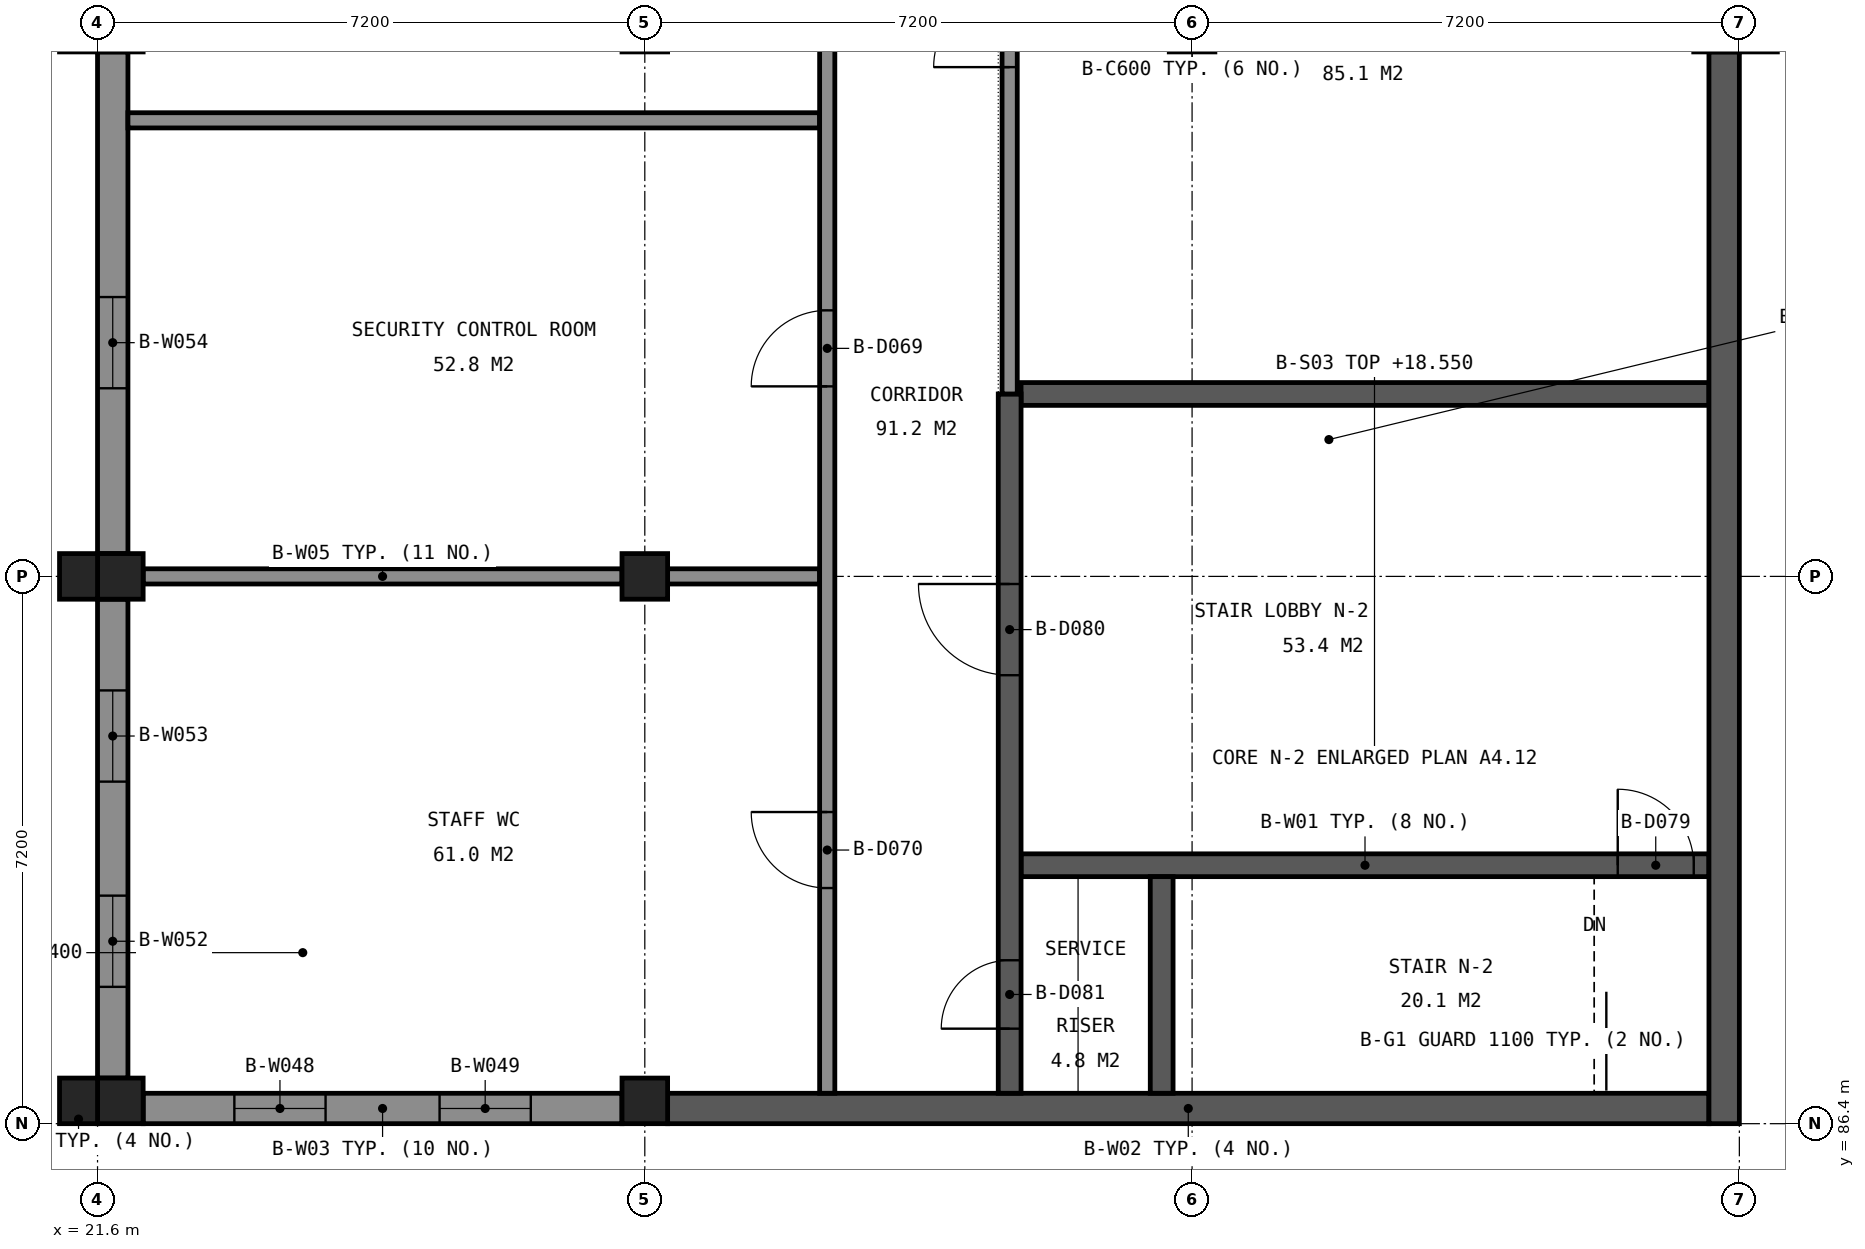
"""IFC4 building model, lengths in metres.
Left out: names, types, materials, properties, quantities, classifications, styles, units other than length and angle.
Written with IfcOpenShell. Run it as: python <this file> out.ifc"""

import sys

from ifc_helpers import new_model, si_unit, direction, frame, frame_2d, origin, origin_2d, place, context, subcontext, project, spatial, rectangle, extrude, element, fill, save


model = new_model("IFC4")
c1 = context("Model", 3, precision=1e-05, world=origin(), true_north=direction((0.0, 1.0)))
c2 = subcontext(c1, "Body", "Model", "MODEL_VIEW")
j1 = project(units=[si_unit("LENGTHUNIT", "METRE"), si_unit("PLANEANGLEUNIT", "RADIAN")], contexts=[c1])
p1 = place(None, origin())
s1 = spatial("IfcSite", under=j1, at=p1, CompositionType="ELEMENT")
p2 = place(p1, origin())
s2 = spatial("IfcBuilding", under=s1, at=p2, CompositionType="ELEMENT")
p3 = place(p2, frame((0.0, 0.0, 14.4)))
s3 = spatial("IfcBuildingStorey", under=s2, at=p3, CompositionType="ELEMENT", Elevation=14.4)
for number, where, z_axis, x_axis in (
    (1, (21.9, 93.6, 0.0), (0.0, 0.0, 1.0), (1.0, 0.0, 0.0)),
    (2, (21.9, 86.7, 0.0), (0.0, 0.0, 1.0), (1.0, 0.0, 0.0)),
):
    element("IfcColumn", number, at=place(p3, frame(where, z_axis=z_axis, x_axis=x_axis)), inside=s3, PredefinedType="COLUMN", context=c2, shape_type="SweptSolid", body=[
        extrude(rectangle(XDim=0.6, YDim=0.6, at=origin_2d()), origin(), (0.0, 0.0, 1.0), 4.138),
    ])
p4 = place(p3, frame((28.8, 93.6, 0.0), z_axis=(0.0, 0.0, 1.0), x_axis=(1.0, 0.0, 0.0)))
e3 = element("IfcColumn", 3, at=p4, inside=s3, PredefinedType="COLUMN", context=c2, shape_type="SweptSolid", body=[
    extrude(rectangle(XDim=0.6, YDim=0.6, at=origin_2d()), origin(), (0.0, 0.0, 1.0), 4.713),
])
p5 = place(p3, frame((28.8, 86.7, 0.0), z_axis=(0.0, 0.0, 1.0), x_axis=(1.0, 0.0, 0.0)))
e4 = element("IfcColumn", 4, at=p5, inside=s3, PredefinedType="COLUMN", context=c2, shape_type="SweptSolid", body=[
    extrude(rectangle(XDim=0.6, YDim=0.6, at=origin_2d()), origin(), (0.0, 0.0, 1.0), 4.138),
])
p6 = place(p3, frame((29.1, 86.6, 0.0), z_axis=(0.0, 0.0, 1.0), x_axis=(1.0, 0.0, 0.0)))
e5 = element("IfcWall", 5, at=p6, inside=s3, PredefinedType="SHEAR", context=c2, shape_type="SweptSolid", body=[
    extrude(rectangle(XDim=13.7, YDim=0.4, at=frame_2d((6.85, 0.0))), origin(), (0.0, 0.0, 1.0), 3.9),
])
p7 = place(p3, frame((33.75, 89.8, 0.0), z_axis=(0.0, 0.0, 1.0), x_axis=(1.0, 0.0, 0.0)))
e6 = element("IfcWall", 6, at=p7, inside=s3, PredefinedType="SHEAR", context=c2, shape_type="SweptSolid", body=[
    extrude(rectangle(XDim=9.05, YDim=0.3, at=frame_2d((4.525, 0.0))), origin(), (0.0, 0.0, 1.0), 3.9),
])
p8 = place(p7, frame((7.85, 0.0, 0.0)))
e7 = element("IfcOpeningElement", 7, at=p8, cuts=e6, PredefinedType="OPENING", context=c2, shape_type="SweptSolid", body=[
    extrude(rectangle(XDim=1.0, YDim=2.1, at=frame_2d((0.5, 1.05))), frame((0.0, 0.16, 0.0), z_axis=(0.0, -1.0, 0.0), x_axis=(1.0, 0.0, 0.0)), (0.0, 0.0, 1.0), 0.32),
])
p9 = place(p3, frame((33.75, 96.0, 0.0), z_axis=(0.0, 0.0, 1.0), x_axis=(1.0, 0.0, 0.0)))
e8 = element("IfcWall", 8, at=p9, inside=s3, PredefinedType="SHEAR", context=c2, shape_type="SweptSolid", body=[
    extrude(rectangle(XDim=9.05, YDim=0.3, at=frame_2d((4.525, 0.0))), origin(), (0.0, 0.0, 1.0), 3.9),
])
p10 = place(p3, frame((33.6, 86.8, 0.0), z_axis=(0.0, 0.0, 1.0), x_axis=(0.0, 1.0, 0.0)))
e9 = element("IfcWall", 9, at=p10, inside=s3, PredefinedType="SHEAR", context=c2, shape_type="SweptSolid", body=[
    extrude(rectangle(XDim=9.2, YDim=0.3, at=frame_2d((4.6, 0.0))), origin(), (0.0, 0.0, 1.0), 3.9),
])
p11 = place(p10, frame((5.5, 0.0, 0.0)))
e10 = element("IfcOpeningElement", 10, at=p11, cuts=e9, PredefinedType="OPENING", context=c2, shape_type="SweptSolid", body=[
    extrude(rectangle(XDim=1.2, YDim=2.1, at=frame_2d((0.6, 1.05))), frame((0.0, 0.16, 0.0), z_axis=(0.0, -1.0, 0.0), x_axis=(1.0, 0.0, 0.0)), (0.0, 0.0, 1.0), 0.32),
])
p12 = place(p10, frame((0.85, 0.0, 0.0)))
e11 = element("IfcOpeningElement", 11, at=p12, cuts=e9, PredefinedType="OPENING", context=c2, shape_type="SweptSolid", body=[
    extrude(rectangle(XDim=0.9, YDim=2.1, at=frame_2d((0.45, 1.05))), frame((0.0, 0.16, 0.0), z_axis=(0.0, -1.0, 0.0), x_axis=(1.0, 0.0, 0.0)), (0.0, 0.0, 1.0), 0.32),
])
p13 = place(p3, frame((35.6, 86.8, 0.0), z_axis=(0.0, 0.0, 1.0), x_axis=(0.0, 1.0, 0.0)))
e12 = element("IfcWall", 12, at=p13, inside=s3, PredefinedType="SHEAR", context=c2, shape_type="SweptSolid", body=[
    extrude(rectangle(XDim=2.85, YDim=0.3, at=frame_2d((1.425, 0.0))), origin(), (0.0, 0.0, 1.0), 3.9),
])
p14 = place(p3, frame((43.0, 86.4, 0.0), z_axis=(0.0, 0.0, 1.0), x_axis=(0.0, 1.0, 0.0)))
e13 = element("IfcWall", 13, at=p14, inside=s3, PredefinedType="SHEAR", context=c2, shape_type="SweptSolid", body=[
    extrude(rectangle(XDim=14.1, YDim=0.4, at=frame_2d((7.05, 0.0))), origin(), (0.0, 0.0, 1.0), 3.9),
])
p15 = place(p3, frame((22.2, 86.6, 0.0), z_axis=(0.0, 0.0, 1.0), x_axis=(1.0, 0.0, 0.0)))
e14 = element("IfcWall", 14, at=p15, inside=s3, PredefinedType="SOLIDWALL", context=c2, shape_type="SweptSolid", body=[
    extrude(rectangle(XDim=6.3, YDim=0.4, at=frame_2d((3.15, 0.0))), origin(), (0.0, 0.0, 1.0), 4.129),
])
p16 = place(p15, frame((1.2, 0.0, 1.6)))
e15 = element("IfcOpeningElement", 15, at=p16, cuts=e14, PredefinedType="OPENING", context=c2, shape_type="SweptSolid", body=[
    extrude(rectangle(XDim=1.2, YDim=1.2, at=frame_2d((0.6, 0.6))), frame((0.0, 0.21, 0.0), z_axis=(0.0, -1.0, 0.0), x_axis=(1.0, 0.0, 0.0)), (0.0, 0.0, 1.0), 0.42),
])
p17 = place(p15, frame((3.9, 0.0, 1.6)))
e16 = element("IfcOpeningElement", 16, at=p17, cuts=e14, PredefinedType="OPENING", context=c2, shape_type="SweptSolid", body=[
    extrude(rectangle(XDim=1.2, YDim=1.2, at=frame_2d((0.6, 0.6))), frame((0.0, 0.21, 0.0), z_axis=(0.0, -1.0, 0.0), x_axis=(1.0, 0.0, 0.0)), (0.0, 0.0, 1.0), 0.42),
])
p18 = place(p3, frame((21.8, 87.0, 0.0), z_axis=(0.0, 0.0, 1.0), x_axis=(0.0, 1.0, 0.0)))
e17 = element("IfcWall", 17, at=p18, inside=s3, PredefinedType="SOLIDWALL", context=c2, shape_type="SweptSolid", body=[
    extrude(rectangle(XDim=6.3, YDim=0.4, at=frame_2d((3.15, 0.0))), origin(), (0.0, 0.0, 1.0), 4.129),
])
p19 = place(p18, frame((1.2, 0.0, 1.6)))
e18 = element("IfcOpeningElement", 18, at=p19, cuts=e17, PredefinedType="OPENING", context=c2, shape_type="SweptSolid", body=[
    extrude(rectangle(XDim=1.2, YDim=1.2, at=frame_2d((0.6, 0.6))), frame((0.0, 0.21, 0.0), z_axis=(0.0, -1.0, 0.0), x_axis=(1.0, 0.0, 0.0)), (0.0, 0.0, 1.0), 0.42),
])
p20 = place(p18, frame((3.9, 0.0, 1.6)))
e19 = element("IfcOpeningElement", 19, at=p20, cuts=e17, PredefinedType="OPENING", context=c2, shape_type="SweptSolid", body=[
    extrude(rectangle(XDim=1.2, YDim=1.2, at=frame_2d((0.6, 0.6))), frame((0.0, 0.21, 0.0), z_axis=(0.0, -1.0, 0.0), x_axis=(1.0, 0.0, 0.0)), (0.0, 0.0, 1.0), 0.42),
])
p21 = place(p3, frame((21.8, 93.9, 0.0), z_axis=(0.0, 0.0, 1.0), x_axis=(0.0, 1.0, 0.0)))
e20 = element("IfcWall", 20, at=p21, inside=s3, PredefinedType="SOLIDWALL", context=c2, shape_type="SweptSolid", body=[
    extrude(rectangle(XDim=6.6, YDim=0.4, at=frame_2d((3.3, 0.0))), origin(), (0.0, 0.0, 1.0), 4.129),
])
p22 = place(p21, frame((2.175, 0.0, 1.6)))
e21 = element("IfcOpeningElement", 21, at=p22, cuts=e20, PredefinedType="OPENING", context=c2, shape_type="SweptSolid", body=[
    extrude(rectangle(XDim=1.2, YDim=1.2, at=frame_2d((0.6, 0.6))), frame((0.0, 0.21, 0.0), z_axis=(0.0, -1.0, 0.0), x_axis=(1.0, 0.0, 0.0)), (0.0, 0.0, 1.0), 0.42),
])
for number, where, z_axis, x_axis in (
    (22, (21.35, 86.7, 0.0), (0.0, 0.0, 1.0), (1.0, 0.0, 0.0)),
    (23, (21.35, 93.6, 0.0), (0.0, 0.0, 1.0), (1.0, 0.0, 0.0)),
):
    element("IfcColumn", number, at=place(p3, frame(where, z_axis=z_axis, x_axis=x_axis)), inside=s3, PredefinedType="COLUMN", context=c2, shape_type="SweptSolid", body=[
        extrude(rectangle(XDim=0.5, YDim=0.6, at=origin_2d()), origin(), (0.0, 0.0, 1.0), 3.8),
    ])
p23 = place(p3, frame((22.2, 93.6, 0.0), z_axis=(0.0, 0.0, 1.0), x_axis=(1.0, 0.0, 0.0)))
e24 = element("IfcWall", 24, at=p23, inside=s3, PredefinedType="PARTITIONING", context=c2, shape_type="SweptSolid", body=[
    extrude(rectangle(XDim=6.3, YDim=0.2, at=frame_2d((3.15, 0.0))), origin(), (0.0, 0.0, 1.0), 4.0),
])
p24 = place(p3, frame((29.1, 93.6, 0.0), z_axis=(0.0, 0.0, 1.0), x_axis=(1.0, 0.0, 0.0)))
e25 = element("IfcWall", 25, at=p24, inside=s3, PredefinedType="PARTITIONING", context=c2, shape_type="SweptSolid", body=[
    extrude(rectangle(XDim=2.0, YDim=0.2, at=frame_2d((1.0, 0.0))), origin(), (0.0, 0.0, 1.0), 4.0),
])
p25 = place(p3, frame((22.0, 99.6, 0.0), z_axis=(0.0, 0.0, 1.0), x_axis=(1.0, 0.0, 0.0)))
e26 = element("IfcWall", 26, at=p25, inside=s3, PredefinedType="PARTITIONING", context=c2, shape_type="SweptSolid", body=[
    extrude(rectangle(XDim=9.1, YDim=0.2, at=frame_2d((4.55, 0.0))), origin(), (0.0, 0.0, 1.0), 4.0),
])
p26 = place(p3, frame((31.2, 86.8, 0.0), z_axis=(0.0, 0.0, 1.0), x_axis=(0.0, 1.0, 0.0)))
e27 = element("IfcWall", 27, at=p26, inside=s3, PredefinedType="PARTITIONING", context=c2, shape_type="SweptSolid", body=[
    extrude(rectangle(XDim=42.4, YDim=0.2, at=frame_2d((21.2, 0.0))), origin(), (0.0, 0.0, 1.0), 4.0),
])
p27 = place(p26, frame((38.7, 0.0, 0.0)))
e28 = element("IfcOpeningElement", 28, at=p27, cuts=e27, PredefinedType="OPENING", context=c2, shape_type="SweptSolid", body=[
    extrude(rectangle(XDim=1.0, YDim=2.1, at=frame_2d((0.5, 1.05))), frame((0.0, 0.11, 0.0), z_axis=(0.0, -1.0, 0.0), x_axis=(1.0, 0.0, 0.0)), (0.0, 0.0, 1.0), 0.22),
])
p28 = place(p26, frame((31.5, 0.0, 0.0)))
e29 = element("IfcOpeningElement", 29, at=p28, cuts=e27, PredefinedType="OPENING", context=c2, shape_type="SweptSolid", body=[
    extrude(rectangle(XDim=1.0, YDim=2.1, at=frame_2d((0.5, 1.05))), frame((0.0, 0.11, 0.0), z_axis=(0.0, -1.0, 0.0), x_axis=(1.0, 0.0, 0.0)), (0.0, 0.0, 1.0), 0.22),
])
p29 = place(p26, frame((24.3, 0.0, 0.0)))
e30 = element("IfcOpeningElement", 30, at=p29, cuts=e27, PredefinedType="OPENING", context=c2, shape_type="SweptSolid", body=[
    extrude(rectangle(XDim=1.0, YDim=2.1, at=frame_2d((0.5, 1.05))), frame((0.0, 0.11, 0.0), z_axis=(0.0, -1.0, 0.0), x_axis=(1.0, 0.0, 0.0)), (0.0, 0.0, 1.0), 0.22),
])
p30 = place(p26, frame((16.5, 0.0, 0.0)))
e31 = element("IfcOpeningElement", 31, at=p30, cuts=e27, PredefinedType="OPENING", context=c2, shape_type="SweptSolid", body=[
    extrude(rectangle(XDim=1.0, YDim=2.1, at=frame_2d((0.5, 1.05))), frame((0.0, 0.11, 0.0), z_axis=(0.0, -1.0, 0.0), x_axis=(1.0, 0.0, 0.0)), (0.0, 0.0, 1.0), 0.22),
])
p31 = place(p26, frame((9.3, 0.0, 0.0)))
e32 = element("IfcOpeningElement", 32, at=p31, cuts=e27, PredefinedType="OPENING", context=c2, shape_type="SweptSolid", body=[
    extrude(rectangle(XDim=1.0, YDim=2.1, at=frame_2d((0.5, 1.05))), frame((0.0, 0.11, 0.0), z_axis=(0.0, -1.0, 0.0), x_axis=(1.0, 0.0, 0.0)), (0.0, 0.0, 1.0), 0.22),
])
p32 = place(p26, frame((2.7, 0.0, 0.0)))
e33 = element("IfcOpeningElement", 33, at=p32, cuts=e27, PredefinedType="OPENING", context=c2, shape_type="SweptSolid", body=[
    extrude(rectangle(XDim=1.0, YDim=2.1, at=frame_2d((0.5, 1.05))), frame((0.0, 0.11, 0.0), z_axis=(0.0, -1.0, 0.0), x_axis=(1.0, 0.0, 0.0)), (0.0, 0.0, 1.0), 0.22),
])
p33 = place(p3, frame((33.6, 96.0, 0.0), z_axis=(0.0, 0.0, 1.0), x_axis=(0.0, 1.0, 0.0)))
e34 = element("IfcWall", 34, at=p33, inside=s3, PredefinedType="PARTITIONING", context=c2, shape_type="SweptSolid", body=[
    extrude(rectangle(XDim=24.0, YDim=0.2, at=frame_2d((12.0, 0.0))), origin(), (0.0, 0.0, 1.0), 4.0),
])
p34 = place(p33, frame((19.9, 0.0, 0.0)))
e35 = element("IfcOpeningElement", 35, at=p34, cuts=e34, PredefinedType="OPENING", context=c2, shape_type="SweptSolid", body=[
    extrude(rectangle(XDim=1.0, YDim=2.1, at=frame_2d((0.5, 1.05))), frame((0.0, 0.11, 0.0), z_axis=(0.0, -1.0, 0.0), x_axis=(1.0, 0.0, 0.0)), (0.0, 0.0, 1.0), 0.22),
])
p35 = place(p33, frame((12.7, 0.0, 0.0)))
e36 = element("IfcOpeningElement", 36, at=p35, cuts=e34, PredefinedType="OPENING", context=c2, shape_type="SweptSolid", body=[
    extrude(rectangle(XDim=1.0, YDim=2.1, at=frame_2d((0.5, 1.05))), frame((0.0, 0.11, 0.0), z_axis=(0.0, -1.0, 0.0), x_axis=(1.0, 0.0, 0.0)), (0.0, 0.0, 1.0), 0.22),
])
p36 = place(p33, frame((4.3, 0.0, 0.0)))
e37 = element("IfcOpeningElement", 37, at=p36, cuts=e34, PredefinedType="OPENING", context=c2, shape_type="SweptSolid", body=[
    extrude(rectangle(XDim=1.0, YDim=2.1, at=frame_2d((0.5, 1.05))), frame((0.0, 0.11, 0.0), z_axis=(0.0, -1.0, 0.0), x_axis=(1.0, 0.0, 0.0)), (0.0, 0.0, 1.0), 0.22),
])
p37 = place(p16, origin())
e38 = element("IfcWindow", 38, at=p37, inside=s3, PartitioningType="SINGLE_PANEL", PredefinedType="WINDOW", context=c2, shape_type="SweptSolid", body=[
    extrude(rectangle(XDim=1.2, YDim=1.2, at=frame_2d((0.6, 0.6))), frame((0.0, 0.03, 0.0), z_axis=(0.0, -1.0, 0.0), x_axis=(1.0, 0.0, 0.0)), (0.0, 0.0, 1.0), 0.06),
])
fill(e15, e38)
p38 = place(p17, origin())
e39 = element("IfcWindow", 39, at=p38, inside=s3, PartitioningType="SINGLE_PANEL", PredefinedType="WINDOW", context=c2, shape_type="SweptSolid", body=[
    extrude(rectangle(XDim=1.2, YDim=1.2, at=frame_2d((0.6, 0.6))), frame((0.0, 0.03, 0.0), z_axis=(0.0, -1.0, 0.0), x_axis=(1.0, 0.0, 0.0)), (0.0, 0.0, 1.0), 0.06),
])
fill(e16, e39)
p39 = place(p19, origin())
e40 = element("IfcWindow", 40, at=p39, inside=s3, PartitioningType="SINGLE_PANEL", PredefinedType="WINDOW", context=c2, shape_type="SweptSolid", body=[
    extrude(rectangle(XDim=1.2, YDim=1.2, at=frame_2d((0.6, 0.6))), frame((0.0, 0.03, 0.0), z_axis=(0.0, -1.0, 0.0), x_axis=(1.0, 0.0, 0.0)), (0.0, 0.0, 1.0), 0.06),
])
fill(e18, e40)
p40 = place(p20, origin())
e41 = element("IfcWindow", 41, at=p40, inside=s3, PartitioningType="SINGLE_PANEL", PredefinedType="WINDOW", context=c2, shape_type="SweptSolid", body=[
    extrude(rectangle(XDim=1.2, YDim=1.2, at=frame_2d((0.6, 0.6))), frame((0.0, 0.03, 0.0), z_axis=(0.0, -1.0, 0.0), x_axis=(1.0, 0.0, 0.0)), (0.0, 0.0, 1.0), 0.06),
])
fill(e19, e41)
p41 = place(p22, origin())
e42 = element("IfcWindow", 42, at=p41, inside=s3, PartitioningType="SINGLE_PANEL", PredefinedType="WINDOW", context=c2, shape_type="SweptSolid", body=[
    extrude(rectangle(XDim=1.2, YDim=1.2, at=frame_2d((0.6, 0.6))), frame((0.0, 0.03, 0.0), z_axis=(0.0, -1.0, 0.0), x_axis=(1.0, 0.0, 0.0)), (0.0, 0.0, 1.0), 0.06),
])
fill(e21, e42)
p42 = place(p31, origin())
e43 = element("IfcDoor", 43, at=p42, inside=s3, OperationType="SINGLE_SWING_LEFT", PredefinedType="DOOR", context=c2, shape_type="SweptSolid", body=[
    extrude(rectangle(XDim=1.0, YDim=2.1, at=frame_2d((0.5, 1.05))), frame((0.0, 0.025, 0.0), z_axis=(0.0, -1.0, 0.0), x_axis=(1.0, 0.0, 0.0)), (0.0, 0.0, 1.0), 0.05),
])
fill(e32, e43)
p43 = place(p32, origin())
e44 = element("IfcDoor", 44, at=p43, inside=s3, OperationType="SINGLE_SWING_RIGHT", PredefinedType="DOOR", context=c2, shape_type="SweptSolid", body=[
    extrude(rectangle(XDim=1.0, YDim=2.1, at=frame_2d((0.5, 1.05))), frame((0.0, 0.025, 0.0), z_axis=(0.0, -1.0, 0.0), x_axis=(1.0, 0.0, 0.0)), (0.0, 0.0, 1.0), 0.05),
])
fill(e33, e44)
p44 = place(p36, origin())
e45 = element("IfcDoor", 45, at=p44, inside=s3, OperationType="SINGLE_SWING_LEFT", PredefinedType="DOOR", context=c2, shape_type="SweptSolid", body=[
    extrude(rectangle(XDim=1.0, YDim=2.1, at=frame_2d((0.5, 1.05))), frame((0.0, 0.025, 0.0), z_axis=(0.0, -1.0, 0.0), x_axis=(1.0, 0.0, 0.0)), (0.0, 0.0, 1.0), 0.05),
])
fill(e37, e45)
p45 = place(p8, origin())
e46 = element("IfcDoor", 46, at=p45, inside=s3, OperationType="SINGLE_SWING_LEFT", PredefinedType="DOOR", context=c2, shape_type="SweptSolid", body=[
    extrude(rectangle(XDim=1.0, YDim=2.1, at=frame_2d((0.5, 1.05))), frame((0.0, 0.025, 0.0), z_axis=(0.0, -1.0, 0.0), x_axis=(1.0, 0.0, 0.0)), (0.0, 0.0, 1.0), 0.05),
])
fill(e7, e46)
p46 = place(p11, origin())
e47 = element("IfcDoor", 47, at=p46, inside=s3, OperationType="SINGLE_SWING_RIGHT", PredefinedType="DOOR", context=c2, shape_type="SweptSolid", body=[
    extrude(rectangle(XDim=1.2, YDim=2.1, at=frame_2d((0.6, 1.05))), frame((0.0, 0.025, 0.0), z_axis=(0.0, -1.0, 0.0), x_axis=(1.0, 0.0, 0.0)), (0.0, 0.0, 1.0), 0.05),
])
fill(e10, e47)
p47 = place(p12, origin())
e48 = element("IfcDoor", 48, at=p47, inside=s3, OperationType="SINGLE_SWING_LEFT", PredefinedType="DOOR", context=c2, shape_type="SweptSolid", body=[
    extrude(rectangle(XDim=0.9, YDim=2.1, at=frame_2d((0.45, 1.05))), frame((0.0, 0.025, 0.0), z_axis=(0.0, -1.0, 0.0), x_axis=(1.0, 0.0, 0.0)), (0.0, 0.0, 1.0), 0.05),
])
fill(e11, e48)
save(model, sys.argv[1])
